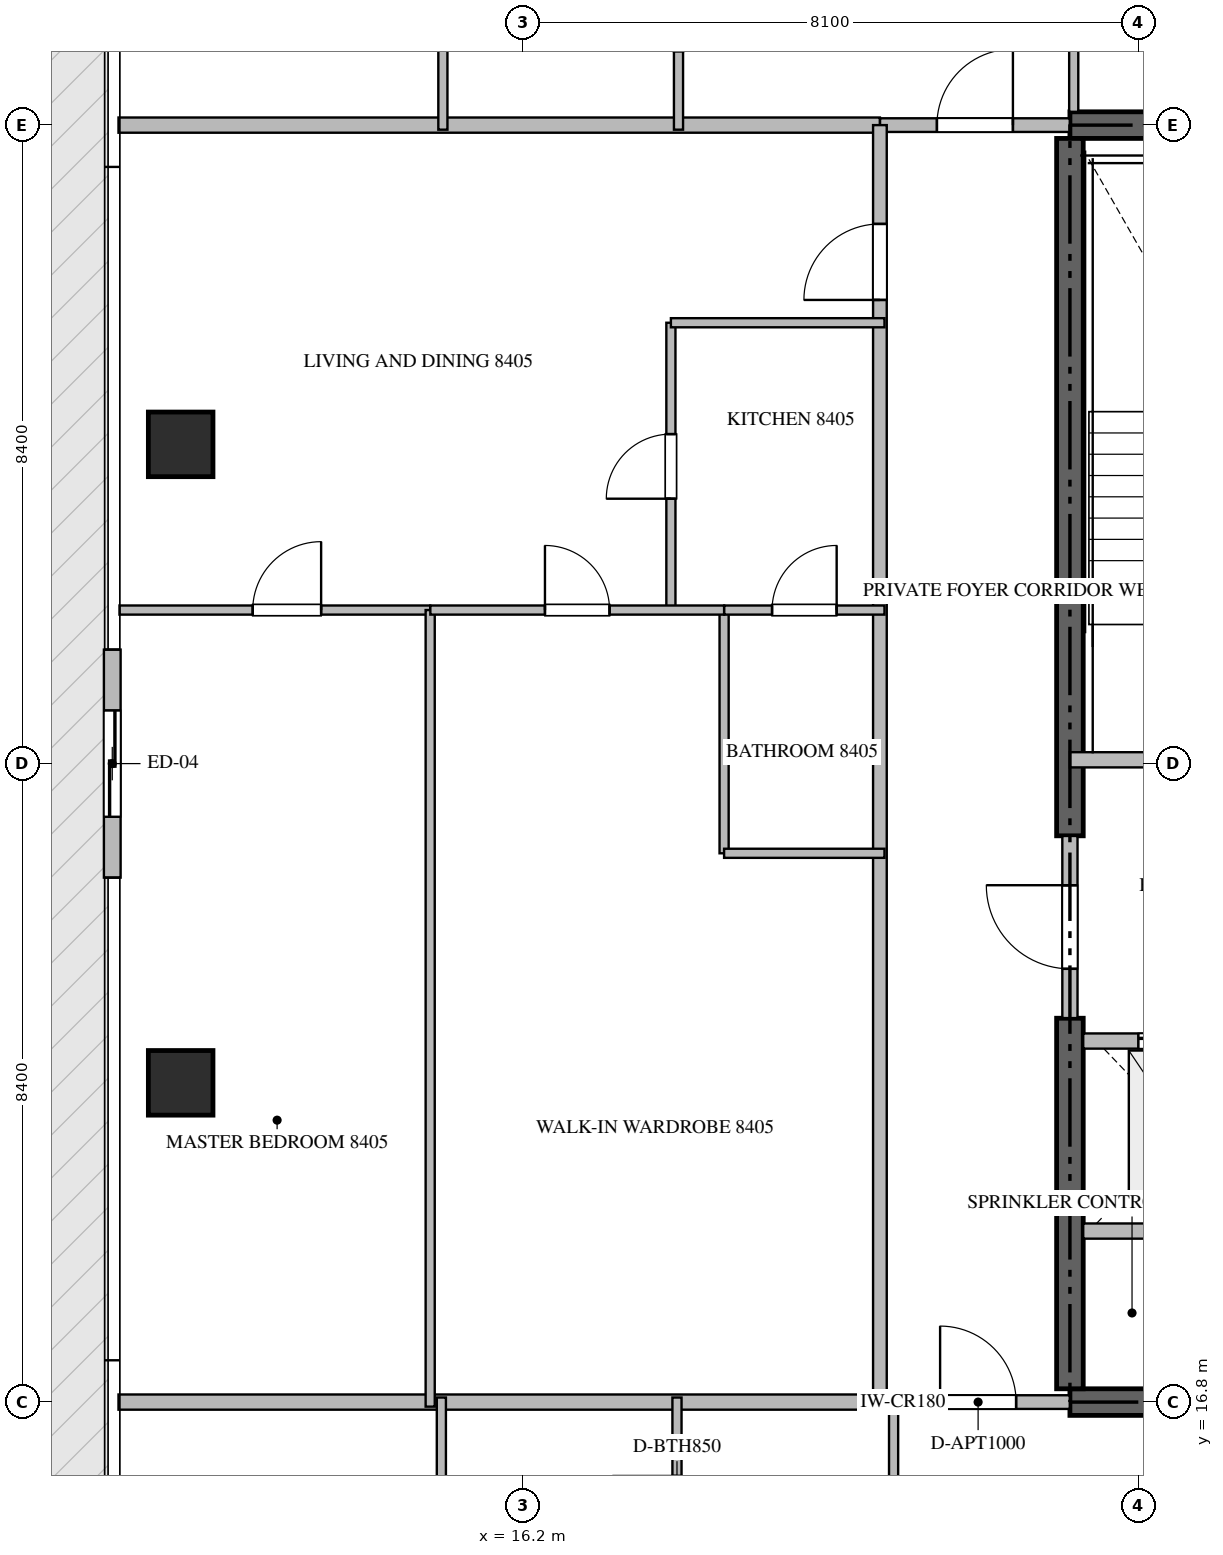
"""IFC4 building model, lengths in metres.
Left out: names, types, materials, properties, quantities, classifications, styles, units other than length and angle.
Written with IfcOpenShell. Run it as: python <this file> out.ifc"""

import sys

from ifc_helpers import new_model, si_unit, direction, frame, frame_2d, origin, origin_2d, place, context, subcontext, project, spatial, rectangle, extrude, source, transform, mapped, element, fill, save


model = new_model("IFC4")
c1 = context("Model", 3, precision=1e-05, world=origin(), true_north=direction((0.0, 1.0)))
c2 = subcontext(c1, "Body", "Model", "MODEL_VIEW")
j1 = project(units=[si_unit("LENGTHUNIT", "METRE"), si_unit("PLANEANGLEUNIT", "RADIAN")], contexts=[c1])
p1 = place(None, origin())
s1 = spatial("IfcSite", under=j1, at=p1, CompositionType="ELEMENT")
p2 = place(p1, origin())
s2 = spatial("IfcBuilding", under=s1, at=p2, CompositionType="ELEMENT")
p3 = place(p2, frame((0.0, 0.0, 338.0)))
s3 = spatial("IfcBuildingStorey", under=s2, at=p3, CompositionType="ELEMENT", Elevation=338.0)
for number, where, z_axis, x_axis in (
    (1, (23.4, 16.8, -0.44), (0.0, 0.0, 1.0), (1.0, 0.0, 0.0)),
    (2, (41.4, 33.6, -0.44), (0.0, 0.0, 1.0), (-1.0, 0.0, 0.0)),
):
    element("IfcWall", number, at=place(p3, frame(where, z_axis=z_axis, x_axis=x_axis)), inside=s3, PredefinedType="SHEAR", context=c2, shape_type="SweptSolid", body=[
        extrude(rectangle(XDim=18.0, YDim=0.35, at=frame_2d((9.0, 0.0))), origin(), (0.0, 0.0, 1.0), 4.228),
    ])
p4 = place(p3, frame((23.4, 16.975, -0.44), z_axis=(0.0, 0.0, 1.0), x_axis=(0.0, 1.0, 0.0)))
e3 = element("IfcWall", 3, at=p4, inside=s3, PredefinedType="SHEAR", context=c2, shape_type="SweptSolid", body=[
    extrude(rectangle(XDim=4.875, YDim=0.35, at=frame_2d((2.438, 0.0))), origin(), (0.0, 0.0, 1.0), 4.228),
])
p5 = place(p3, frame((23.4, 24.25, -0.44), z_axis=(0.0, 0.0, 1.0), x_axis=(0.0, 1.0, 0.0)))
e4 = element("IfcWall", 4, at=p5, inside=s3, PredefinedType="SHEAR", context=c2, shape_type="SweptSolid", body=[
    extrude(rectangle(XDim=9.175, YDim=0.35, at=frame_2d((4.587, 0.0))), origin(), (0.0, 0.0, 1.0), 4.228),
])
m1 = source(origin(), c2, "Body", "SweptSolid", [
    extrude(rectangle(XDim=0.85, YDim=0.85, at=origin_2d()), origin(), (0.0, 0.0, 1.0), 4.23),
])
for number, where, z_axis, x_axis in (
    (5, (11.7, 21.0, -0.44), (0.0, 0.0, 1.0), (1.0, 0.0, 0.0)),
    (6, (11.7, 29.4, -0.44), (0.0, 0.0, 1.0), (1.0, 0.0, 0.0)),
):
    element("IfcColumn", number, at=place(p3, frame(where, z_axis=z_axis, x_axis=x_axis)), inside=s3, PredefinedType="COLUMN", context=c2, shape_type="MappedRepresentation", body=[
        mapped(m1, transform((0.0, 0.0, 0.0), scale=1.0)),
    ])
p6 = place(p3, frame((10.8, 26.7, 0.0), z_axis=(0.0, 0.0, 1.0), x_axis=(0.0, -1.0, 0.0)))
e7 = element("IfcWall", 7, at=p6, inside=s3, PredefinedType="ELEMENTEDWALL", context=c2, shape_type="SweptSolid", body=[
    extrude(rectangle(XDim=3.0, YDim=0.22, at=frame_2d((1.5, 0.0))), origin(), (0.0, 0.0, 1.0), 3.775),
])
p7 = place(p6, frame((0.8, 0.0, 0.0)))
e8 = element("IfcOpeningElement", 8, at=p7, cuts=e7, PredefinedType="OPENING", context=c2, shape_type="SweptSolid", body=[
    extrude(rectangle(XDim=1.4, YDim=2.25, at=frame_2d((0.7, 1.125))), frame((0.0, 0.12, 0.0), z_axis=(0.0, -1.0, 0.0), x_axis=(1.0, 0.0, 0.0)), (0.0, 0.0, 1.0), 0.24),
])
p8 = place(p3, frame((23.4, 25.25, 0.0), z_axis=(0.0, 0.0, 1.0), x_axis=(1.0, 0.0, 0.0)))
e9 = element("IfcWall", 9, at=p8, inside=s3, PredefinedType="STANDARD", context=c2, shape_type="SweptSolid", body=[
    extrude(rectangle(XDim=4.45, YDim=0.2, at=frame_2d((2.225, 0.0))), origin(), (0.0, 0.0, 1.0), 3.79),
])
p9 = place(p8, frame((1.65, 0.0, 0.0)))
e10 = element("IfcOpeningElement", 10, at=p9, cuts=e9, PredefinedType="OPENING", context=c2, shape_type="SweptSolid", body=[
    extrude(rectangle(XDim=1.1, YDim=2.15, at=frame_2d((0.55, 1.075))), frame((0.0, 0.11, 0.0), z_axis=(0.0, -1.0, 0.0), x_axis=(1.0, 0.0, 0.0)), (0.0, 0.0, 1.0), 0.22),
])
p10 = place(p3, frame((23.575, 21.55, 0.0), z_axis=(0.0, 0.0, 1.0), x_axis=(1.0, 0.0, 0.0)))
e11 = element("IfcWall", 11, at=p10, inside=s3, PredefinedType="STANDARD", context=c2, shape_type="SweptSolid", body=[
    extrude(rectangle(XDim=2.475, YDim=0.2, at=frame_2d((1.238, 0.0))), origin(), (0.0, 0.0, 1.0), 3.79),
])
p11 = place(p10, frame((0.725, 0.0, 0.0)))
e12 = element("IfcOpeningElement", 12, at=p11, cuts=e11, PredefinedType="OPENING", context=c2, shape_type="SweptSolid", body=[
    extrude(rectangle(XDim=1.2, YDim=2.2, at=frame_2d((0.6, 1.1))), frame((0.0, 0.11, 0.0), z_axis=(0.0, -1.0, 0.0), x_axis=(1.0, 0.0, 0.0)), (0.0, 0.0, 1.0), 0.22),
])
p12 = place(p3, frame((23.575, 19.05, 0.0), z_axis=(0.0, 0.0, 1.0), x_axis=(1.0, 0.0, 0.0)))
e13 = element("IfcWall", 13, at=p12, inside=s3, PredefinedType="STANDARD", context=c2, shape_type="SweptSolid", body=[
    extrude(rectangle(XDim=2.475, YDim=0.2, at=frame_2d((1.238, 0.0))), origin(), (0.0, 0.0, 1.0), 3.79),
])
p13 = place(p3, frame((23.4, 21.852, 0.0), z_axis=(0.0, 0.0, 1.0), x_axis=(0.0, 1.0, 0.0)))
e14 = element("IfcWall", 14, at=p13, inside=s3, PredefinedType="STANDARD", context=c2, shape_type="SweptSolid", body=[
    extrude(rectangle(XDim=2.396, YDim=0.2, at=frame_2d((1.198, 0.0))), origin(), (0.0, 0.0, 1.0), 3.79),
])
p14 = place(p13, frame((0.648, 0.0, 0.0)))
e15 = element("IfcOpeningElement", 15, at=p14, cuts=e14, PredefinedType="OPENING", context=c2, shape_type="SweptSolid", body=[
    extrude(rectangle(XDim=1.1, YDim=2.15, at=frame_2d((0.55, 1.075))), frame((0.0, 0.11, 0.0), z_axis=(0.0, -1.0, 0.0), x_axis=(1.0, 0.0, 0.0)), (0.0, 0.0, 1.0), 0.22),
])
for number, where, z_axis, x_axis in (
    (16, (10.882, 16.8, 0.0), (0.0, 0.0, 1.0), (1.0, 0.0, 0.0)),
    (17, (10.882, 33.6, 0.0), (0.0, 0.0, 1.0), (1.0, 0.0, 0.0)),
):
    element("IfcWall", number, at=place(p3, frame(where, z_axis=z_axis, x_axis=x_axis)), inside=s3, PredefinedType="PARTITIONING", context=c2, shape_type="SweptSolid", body=[
        extrude(rectangle(XDim=10.018, YDim=0.2, at=frame_2d((5.009, 0.0))), origin(), (0.0, 0.0, 1.0), 3.79),
    ])
p15 = place(p3, frame((20.902, 16.8, 0.0), z_axis=(0.0, 0.0, 1.0), x_axis=(1.0, 0.0, 0.0)))
e18 = element("IfcWall", 18, at=p15, inside=s3, PredefinedType="PARTITIONING", context=c2, shape_type="SweptSolid", body=[
    extrude(rectangle(XDim=2.496, YDim=0.18, at=frame_2d((1.248, 0.0))), origin(), (0.0, 0.0, 1.0), 3.79),
])
p16 = place(p15, frame((0.79, 0.0, 0.0)))
e19 = element("IfcOpeningElement", 19, at=p16, cuts=e18, PredefinedType="OPENING", context=c2, shape_type="SweptSolid", body=[
    extrude(rectangle(XDim=1.0, YDim=2.15, at=frame_2d((0.5, 1.075))), frame((0.0, 0.1, 0.0), z_axis=(0.0, -1.0, 0.0), x_axis=(1.0, 0.0, 0.0)), (0.0, 0.0, 1.0), 0.2),
])
p17 = place(p3, frame((20.902, 33.6, 0.0), z_axis=(0.0, 0.0, 1.0), x_axis=(1.0, 0.0, 0.0)))
e20 = element("IfcWall", 20, at=p17, inside=s3, PredefinedType="PARTITIONING", context=c2, shape_type="SweptSolid", body=[
    extrude(rectangle(XDim=2.496, YDim=0.18, at=frame_2d((1.248, 0.0))), origin(), (0.0, 0.0, 1.0), 3.79),
])
p18 = place(p17, frame((0.748, 0.0, 0.0)))
e21 = element("IfcOpeningElement", 21, at=p18, cuts=e20, PredefinedType="OPENING", context=c2, shape_type="SweptSolid", body=[
    extrude(rectangle(XDim=1.0, YDim=2.15, at=frame_2d((0.5, 1.075))), frame((0.0, 0.1, 0.0), z_axis=(0.0, -1.0, 0.0), x_axis=(1.0, 0.0, 0.0)), (0.0, 0.0, 1.0), 0.2),
])
p19 = place(p3, frame((20.9, 16.8, 0.0), z_axis=(0.0, 0.0, 1.0), x_axis=(0.0, 1.0, 0.0)))
e22 = element("IfcWall", 22, at=p19, inside=s3, PredefinedType="PARTITIONING", context=c2, shape_type="SweptSolid", body=[
    extrude(rectangle(XDim=16.8, YDim=0.18, at=frame_2d((8.4, 0.0))), origin(), (0.0, 0.0, 1.0), 3.79),
])
p20 = place(p19, frame((14.5, 0.0, 0.0)))
e23 = element("IfcOpeningElement", 23, at=p20, cuts=e22, PredefinedType="OPENING", context=c2, shape_type="SweptSolid", body=[
    extrude(rectangle(XDim=1.0, YDim=2.15, at=frame_2d((0.5, 1.075))), frame((0.0, 0.1, 0.0), z_axis=(0.0, -1.0, 0.0), x_axis=(1.0, 0.0, 0.0)), (0.0, 0.0, 1.0), 0.2),
])
p21 = place(p3, frame((21.08, 14.05, 0.0), z_axis=(0.0, 0.0, 1.0), x_axis=(0.0, 1.0, 0.0)))
e24 = element("IfcWall", 24, at=p21, inside=s3, PredefinedType="PARTITIONING", context=c2, shape_type="SweptSolid", body=[
    extrude(rectangle(XDim=2.81, YDim=0.12, at=frame_2d((1.405, 0.0))), origin(), (0.0, 0.0, 1.0), 3.79),
])
p22 = place(p3, frame((15.13, 13.944, 0.0), z_axis=(0.0, 0.0, 1.0), x_axis=(0.0, 1.0, 0.0)))
e25 = element("IfcWall", 25, at=p22, inside=s3, PredefinedType="PARTITIONING", context=c2, shape_type="SweptSolid", body=[
    extrude(rectangle(XDim=2.916, YDim=0.12, at=frame_2d((1.458, 0.0))), origin(), (0.0, 0.0, 1.0), 3.79),
])
p23 = place(p3, frame((18.23, 13.946, 0.0), z_axis=(0.0, 0.0, 1.0), x_axis=(0.0, 1.0, 0.0)))
e26 = element("IfcWall", 26, at=p23, inside=s3, PredefinedType="PARTITIONING", context=c2, shape_type="SweptSolid", body=[
    extrude(rectangle(XDim=2.914, YDim=0.12, at=frame_2d((1.457, 0.0))), origin(), (0.0, 0.0, 1.0), 3.79),
])
p24 = place(p23, frame((1.032, 0.0, 0.0)))
e27 = element("IfcOpeningElement", 27, at=p24, cuts=e26, PredefinedType="OPENING", context=c2, shape_type="SweptSolid", body=[
    extrude(rectangle(XDim=0.85, YDim=2.1, at=frame_2d((0.425, 1.05))), frame((0.0, 0.07, 0.0), z_axis=(0.0, -1.0, 0.0), x_axis=(1.0, 0.0, 0.0)), (0.0, 0.0, 1.0), 0.14),
])
p25 = place(p3, frame((23.45, 36.35, 0.0), z_axis=(0.0, 0.0, 1.0), x_axis=(0.0, -1.0, 0.0)))
e28 = element("IfcWall", 28, at=p25, inside=s3, PredefinedType="PARTITIONING", context=c2, shape_type="SweptSolid", body=[
    extrude(rectangle(XDim=2.575, YDim=0.12, at=frame_2d((1.288, 0.0))), origin(), (0.0, 0.0, 1.0), 3.79),
])
p26 = place(p3, frame((15.15, 36.456, 0.0), z_axis=(0.0, 0.0, 1.0), x_axis=(0.0, -1.0, 0.0)))
e29 = element("IfcWall", 29, at=p26, inside=s3, PredefinedType="PARTITIONING", context=c2, shape_type="SweptSolid", body=[
    extrude(rectangle(XDim=2.916, YDim=0.12, at=frame_2d((1.458, 0.0))), origin(), (0.0, 0.0, 1.0), 3.79),
])
p27 = place(p3, frame((18.25, 36.454, 0.0), z_axis=(0.0, 0.0, 1.0), x_axis=(0.0, -1.0, 0.0)))
e30 = element("IfcWall", 30, at=p27, inside=s3, PredefinedType="PARTITIONING", context=c2, shape_type="SweptSolid", body=[
    extrude(rectangle(XDim=2.914, YDim=0.12, at=frame_2d((1.457, 0.0))), origin(), (0.0, 0.0, 1.0), 3.79),
])
p28 = place(p27, frame((1.032, 0.0, 0.0)))
e31 = element("IfcOpeningElement", 31, at=p28, cuts=e30, PredefinedType="OPENING", context=c2, shape_type="SweptSolid", body=[
    extrude(rectangle(XDim=0.85, YDim=2.1, at=frame_2d((0.425, 1.05))), frame((0.0, 0.07, 0.0), z_axis=(0.0, -1.0, 0.0), x_axis=(1.0, 0.0, 0.0)), (0.0, 0.0, 1.0), 0.14),
])
p29 = place(p3, frame((18.15, 27.22, 0.0), z_axis=(0.0, 0.0, 1.0), x_axis=(0.0, 1.0, 0.0)))
e32 = element("IfcWall", 32, at=p29, inside=s3, PredefinedType="PARTITIONING", context=c2, shape_type="SweptSolid", body=[
    extrude(rectangle(XDim=3.78, YDim=0.12, at=frame_2d((1.89, 0.0))), origin(), (0.0, 0.0, 1.0), 3.79),
])
p30 = place(p29, frame((1.465, 0.0, 0.0)))
e33 = element("IfcOpeningElement", 33, at=p30, cuts=e32, PredefinedType="OPENING", context=c2, shape_type="SweptSolid", body=[
    extrude(rectangle(XDim=0.85, YDim=2.1, at=frame_2d((0.425, 1.05))), frame((0.0, 0.07, 0.0), z_axis=(0.0, -1.0, 0.0), x_axis=(1.0, 0.0, 0.0)), (0.0, 0.0, 1.0), 0.14),
])
p31 = place(p3, frame((18.15, 31.0, 0.0), z_axis=(0.0, 0.0, 1.0), x_axis=(1.0, 0.0, 0.0)))
e34 = element("IfcWall", 34, at=p31, inside=s3, PredefinedType="PARTITIONING", context=c2, shape_type="SweptSolid", body=[
    extrude(rectangle(XDim=2.81, YDim=0.12, at=frame_2d((1.405, 0.0))), origin(), (0.0, 0.0, 1.0), 3.79),
])
p32 = place(p3, frame((10.895, 27.22, 0.0), z_axis=(0.0, 0.0, 1.0), x_axis=(1.0, 0.0, 0.0)))
e35 = element("IfcWall", 35, at=p32, inside=s3, PredefinedType="PARTITIONING", context=c2, shape_type="SweptSolid", body=[
    extrude(rectangle(XDim=4.088, YDim=0.12, at=frame_2d((2.044, 0.0))), origin(), (0.0, 0.0, 1.0), 3.79),
])
p33 = place(p32, frame((1.753, 0.0, 0.0)))
e36 = element("IfcOpeningElement", 36, at=p33, cuts=e35, PredefinedType="OPENING", context=c2, shape_type="SweptSolid", body=[
    extrude(rectangle(XDim=0.9, YDim=2.1, at=frame_2d((0.45, 1.05))), frame((0.0, 0.07, 0.0), z_axis=(0.0, -1.0, 0.0), x_axis=(1.0, 0.0, 0.0)), (0.0, 0.0, 1.0), 0.14),
])
p34 = place(p3, frame((14.983, 16.74, 0.0), z_axis=(0.0, 0.0, 1.0), x_axis=(0.0, 1.0, 0.0)))
e37 = element("IfcWall", 37, at=p34, inside=s3, PredefinedType="PARTITIONING", context=c2, shape_type="SweptSolid", body=[
    extrude(rectangle(XDim=10.48, YDim=0.12, at=frame_2d((5.24, 0.0))), origin(), (0.0, 0.0, 1.0), 3.79),
])
p35 = place(p3, frame((18.85, 24.02, 0.0), z_axis=(0.0, 0.0, 1.0), x_axis=(0.0, 1.0, 0.0)))
e38 = element("IfcWall", 38, at=p35, inside=s3, PredefinedType="PARTITIONING", context=c2, shape_type="SweptSolid", body=[
    extrude(rectangle(XDim=3.2, YDim=0.12, at=frame_2d((1.6, 0.0))), origin(), (0.0, 0.0, 1.0), 3.79),
])
p36 = place(p3, frame((18.85, 24.02, 0.0), z_axis=(0.0, 0.0, 1.0), x_axis=(1.0, 0.0, 0.0)))
e39 = element("IfcWall", 39, at=p36, inside=s3, PredefinedType="PARTITIONING", context=c2, shape_type="SweptSolid", body=[
    extrude(rectangle(XDim=2.11, YDim=0.12, at=frame_2d((1.055, 0.0))), origin(), (0.0, 0.0, 1.0), 3.79),
])
p37 = place(p3, frame((14.985, 27.22, 0.0), z_axis=(0.0, 0.0, 1.0), x_axis=(1.0, 0.0, 0.0)))
e40 = element("IfcWall", 40, at=p37, inside=s3, PredefinedType="PARTITIONING", context=c2, shape_type="SweptSolid", body=[
    extrude(rectangle(XDim=3.865, YDim=0.12, at=frame_2d((1.933, 0.0))), origin(), (0.0, 0.0, 1.0), 3.79),
])
p38 = place(p37, frame((1.508, 0.0, 0.0)))
e41 = element("IfcOpeningElement", 41, at=p38, cuts=e40, PredefinedType="OPENING", context=c2, shape_type="SweptSolid", body=[
    extrude(rectangle(XDim=0.85, YDim=2.1, at=frame_2d((0.425, 1.05))), frame((0.0, 0.07, 0.0), z_axis=(0.0, -1.0, 0.0), x_axis=(1.0, 0.0, 0.0)), (0.0, 0.0, 1.0), 0.14),
])
p39 = place(p3, frame((18.852, 27.22, 0.0), z_axis=(0.0, 0.0, 1.0), x_axis=(1.0, 0.0, 0.0)))
e42 = element("IfcWall", 42, at=p39, inside=s3, PredefinedType="PARTITIONING", context=c2, shape_type="SweptSolid", body=[
    extrude(rectangle(XDim=2.108, YDim=0.12, at=frame_2d((1.054, 0.0))), origin(), (0.0, 0.0, 1.0), 3.79),
])
p40 = place(p39, frame((0.629, 0.0, 0.0)))
e43 = element("IfcOpeningElement", 43, at=p40, cuts=e42, PredefinedType="OPENING", context=c2, shape_type="SweptSolid", body=[
    extrude(rectangle(XDim=0.85, YDim=2.1, at=frame_2d((0.425, 1.05))), frame((0.0, 0.07, 0.0), z_axis=(0.0, -1.0, 0.0), x_axis=(1.0, 0.0, 0.0)), (0.0, 0.0, 1.0), 0.14),
])
m2 = source(origin(), c2, "Body", "SweptSolid", [
    extrude(rectangle(XDim=1.4, YDim=2.25, at=frame_2d((0.7, 1.125))), frame((0.0, 0.025, 0.0), z_axis=(0.0, -1.0, 0.0), x_axis=(1.0, 0.0, 0.0)), (0.0, 0.0, 1.0), 0.05),
])
p41 = place(p7, origin())
e44 = element("IfcDoor", 44, at=p41, inside=s3, OperationType="SLIDING_TO_LEFT", PredefinedType="DOOR", context=c2, shape_type="MappedRepresentation", body=[
    mapped(m2, transform((0.0, 0.0, 0.0), scale=1.0)),
])
fill(e8, e44)
m3 = source(origin(), c2, "Body", "SweptSolid", [
    extrude(rectangle(XDim=1.2, YDim=2.2, at=frame_2d((0.6, 1.1))), frame((0.0, 0.025, 0.0), z_axis=(0.0, -1.0, 0.0), x_axis=(1.0, 0.0, 0.0)), (0.0, 0.0, 1.0), 0.05),
])
p42 = place(p11, origin())
e45 = element("IfcDoor", 45, at=p42, inside=s3, OperationType="DOUBLE_DOOR_SLIDING", PredefinedType="DOOR", context=c2, shape_type="MappedRepresentation", body=[
    mapped(m3, transform((0.0, 0.0, 0.0), scale=1.0)),
])
fill(e12, e45)
m4 = source(origin(), c2, "Body", "SweptSolid", [
    extrude(rectangle(XDim=1.1, YDim=2.15, at=frame_2d((0.55, 1.075))), frame((0.0, 0.025, 0.0), z_axis=(0.0, -1.0, 0.0), x_axis=(1.0, 0.0, 0.0)), (0.0, 0.0, 1.0), 0.05),
])
p43 = place(p14, origin())
e46 = element("IfcDoor", 46, at=p43, inside=s3, OperationType="SINGLE_SWING_RIGHT", PredefinedType="DOOR", context=c2, shape_type="MappedRepresentation", body=[
    mapped(m4, transform((0.0, 0.0, 0.0), scale=1.0)),
])
fill(e15, e46)
m5 = source(origin(), c2, "Body", "SweptSolid", [
    extrude(rectangle(XDim=1.0, YDim=2.15, at=frame_2d((0.5, 1.075))), frame((0.0, 0.025, 0.0), z_axis=(0.0, -1.0, 0.0), x_axis=(1.0, 0.0, 0.0)), (0.0, 0.0, 1.0), 0.05),
])
p44 = place(p16, origin())
e47 = element("IfcDoor", 47, at=p44, inside=s3, OperationType="SINGLE_SWING_LEFT", PredefinedType="DOOR", context=c2, shape_type="MappedRepresentation", body=[
    mapped(m5, transform((0.0, 0.0, 0.0), scale=1.0)),
])
fill(e19, e47)
p45 = place(p18, origin())
e48 = element("IfcDoor", 48, at=p45, inside=s3, OperationType="SINGLE_SWING_RIGHT", PredefinedType="DOOR", context=c2, shape_type="MappedRepresentation", body=[
    mapped(m5, transform((0.0, 0.0, 0.0), scale=1.0)),
])
fill(e21, e48)
p46 = place(p20, origin())
e49 = element("IfcDoor", 49, at=p46, inside=s3, OperationType="SINGLE_SWING_LEFT", PredefinedType="DOOR", context=c2, shape_type="MappedRepresentation", body=[
    mapped(m5, transform((0.0, 0.0, 0.0), scale=1.0)),
])
fill(e23, e49)
m6 = source(origin(), c2, "Body", "SweptSolid", [
    extrude(rectangle(XDim=0.85, YDim=2.1, at=frame_2d((0.425, 1.05))), frame((0.0, 0.025, 0.0), z_axis=(0.0, -1.0, 0.0), x_axis=(1.0, 0.0, 0.0)), (0.0, 0.0, 1.0), 0.05),
])
p47 = place(p30, origin())
e50 = element("IfcDoor", 50, at=p47, inside=s3, OperationType="SINGLE_SWING_LEFT", PredefinedType="DOOR", context=c2, shape_type="MappedRepresentation", body=[
    mapped(m6, transform((0.0, 0.0, 0.0), scale=1.0)),
])
fill(e33, e50)
m7 = source(origin(), c2, "Body", "SweptSolid", [
    extrude(rectangle(XDim=0.9, YDim=2.1, at=frame_2d((0.45, 1.05))), frame((0.0, 0.025, 0.0), z_axis=(0.0, -1.0, 0.0), x_axis=(1.0, 0.0, 0.0)), (0.0, 0.0, 1.0), 0.05),
])
p48 = place(p33, origin())
e51 = element("IfcDoor", 51, at=p48, inside=s3, OperationType="SINGLE_SWING_RIGHT", PredefinedType="DOOR", context=c2, shape_type="MappedRepresentation", body=[
    mapped(m7, transform((0.0, 0.0, 0.0), scale=1.0)),
])
fill(e36, e51)
p49 = place(p38, origin())
e52 = element("IfcDoor", 52, at=p49, inside=s3, OperationType="SINGLE_SWING_LEFT", PredefinedType="DOOR", context=c2, shape_type="MappedRepresentation", body=[
    mapped(m6, transform((0.0, 0.0, 0.0), scale=1.0)),
])
fill(e41, e52)
p50 = place(p40, origin())
e53 = element("IfcDoor", 53, at=p50, inside=s3, OperationType="SINGLE_SWING_RIGHT", PredefinedType="DOOR", context=c2, shape_type="MappedRepresentation", body=[
    mapped(m6, transform((0.0, 0.0, 0.0), scale=1.0)),
])
fill(e43, e53)
save(model, sys.argv[1])
